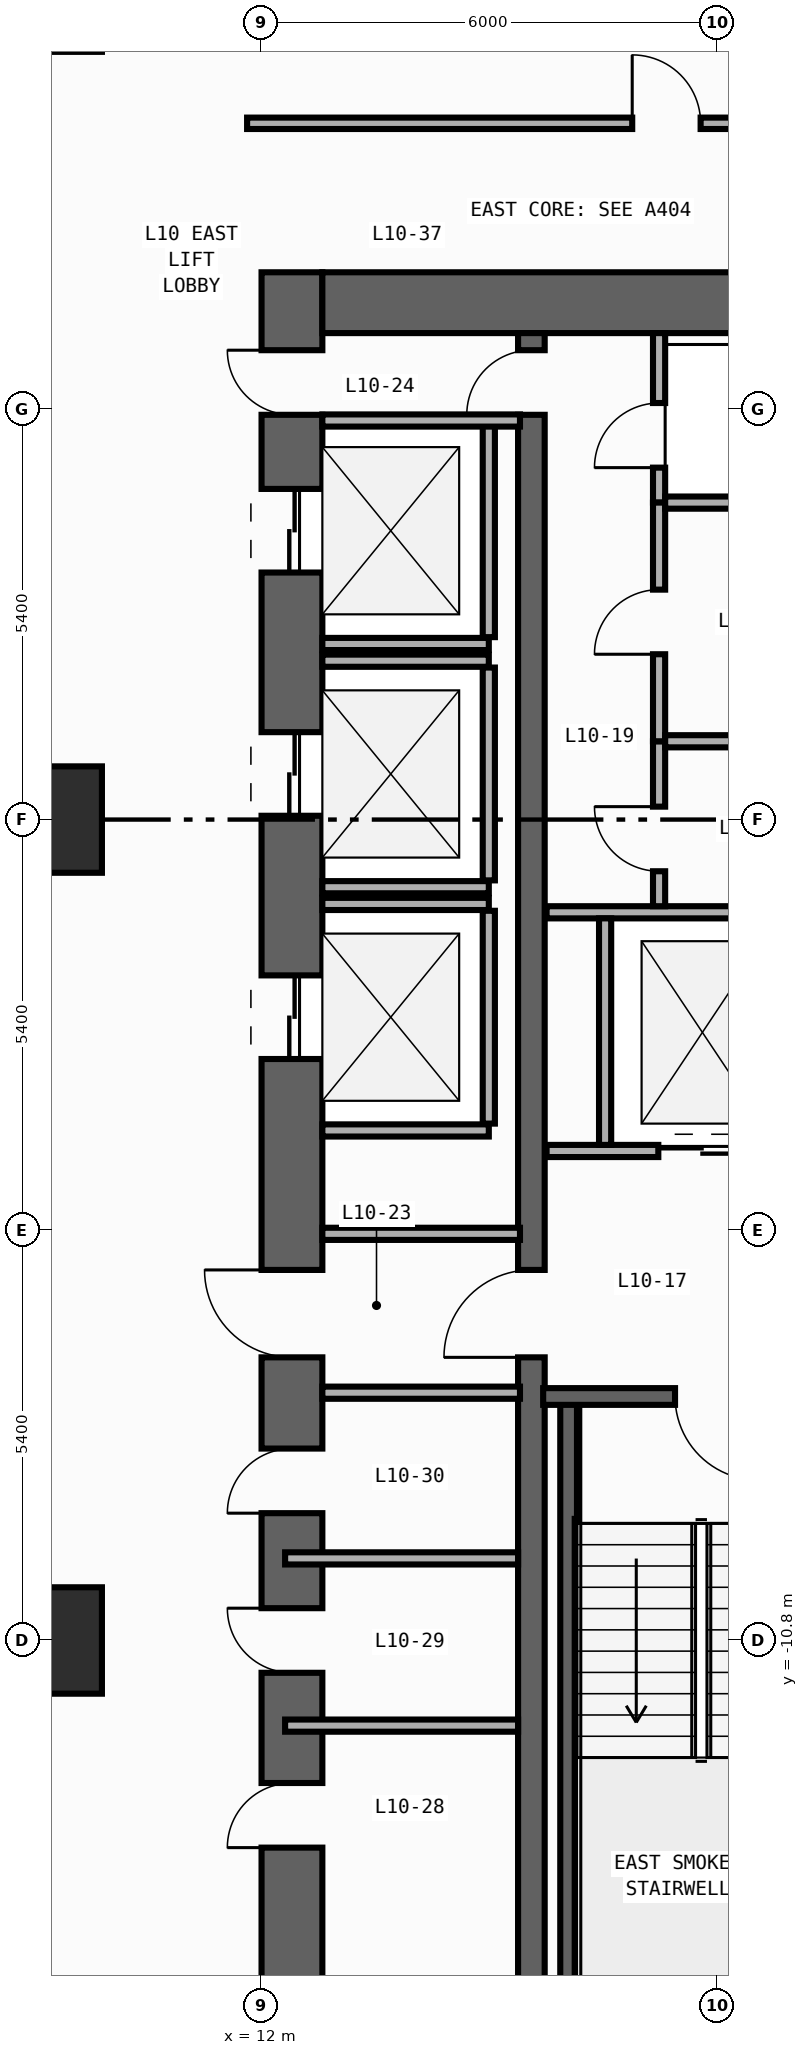
"""IFC4 building model, lengths in metres.
Left out: names, types, materials, properties, quantities, classifications, styles, units other than length and angle.
Written with IfcOpenShell. Run it as: python <this file> out.ifc"""

import sys

from ifc_helpers import new_model, si_unit, direction, frame, frame_2d, origin, origin_2d, place, context, subcontext, project, spatial, rectangle, extrude, element, fill, save


model = new_model("IFC4")
c1 = context("Model", 3, precision=1e-05, world=origin(), true_north=direction((0.0, 1.0)))
c2 = subcontext(c1, "Body", "Model", "MODEL_VIEW")
j1 = project(units=[si_unit("LENGTHUNIT", "METRE"), si_unit("PLANEANGLEUNIT", "RADIAN")], contexts=[c1])
p1 = place(None, origin())
s1 = spatial("IfcSite", under=j1, at=p1, CompositionType="ELEMENT")
p2 = place(p1, origin())
s2 = spatial("IfcBuilding", under=s1, at=p2, CompositionType="ELEMENT")
p3 = place(p2, frame((0.0, 0.0, 42.8)))
s3 = spatial("IfcBuildingStorey", under=s2, at=p3, CompositionType="ELEMENT", Elevation=42.8)
p4 = place(p3, frame((12.4, -19.8, 0.0), z_axis=(0.0, 0.0, 1.0), x_axis=(0.0, 1.0, 0.0)))
e1 = element("IfcWall", 1, at=p4, inside=s3, PredefinedType="SHEAR", context=c2, shape_type="SweptSolid", body=[
    extrude(rectangle(XDim=27.0, YDim=0.8, at=frame_2d((13.5, 0.0))), origin(), (0.0, 0.0, 1.0), 3.94),
])
p5 = place(p4, frame((23.05, 0.0, 0.0)))
e2 = element("IfcOpeningElement", 2, at=p5, cuts=e1, PredefinedType="OPENING", context=c2, shape_type="SweptSolid", body=[
    extrude(rectangle(XDim=1.1, YDim=2.2, at=frame_2d((0.55, 1.1))), frame((0.0, 0.41, 0.0), z_axis=(0.0, -1.0, 0.0), x_axis=(1.0, 0.0, 0.0)), (0.0, 0.0, 1.0), 0.82),
])
p6 = place(p4, frame((19.85, 0.0, 0.0)))
e3 = element("IfcOpeningElement", 3, at=p6, cuts=e1, PredefinedType="OPENING", context=c2, shape_type="SweptSolid", body=[
    extrude(rectangle(XDim=1.1, YDim=2.2, at=frame_2d((0.55, 1.1))), frame((0.0, 0.41, 0.0), z_axis=(0.0, -1.0, 0.0), x_axis=(1.0, 0.0, 0.0)), (0.0, 0.0, 1.0), 0.82),
])
p7 = place(p4, frame((16.65, 0.0, 0.0)))
e4 = element("IfcOpeningElement", 4, at=p7, cuts=e1, PredefinedType="OPENING", context=c2, shape_type="SweptSolid", body=[
    extrude(rectangle(XDim=1.1, YDim=2.2, at=frame_2d((0.55, 1.1))), frame((0.0, 0.41, 0.0), z_axis=(0.0, -1.0, 0.0), x_axis=(1.0, 0.0, 0.0)), (0.0, 0.0, 1.0), 0.82),
])
p8 = place(p4, frame((6.275, 0.0, 0.0)))
e5 = element("IfcOpeningElement", 5, at=p8, cuts=e1, PredefinedType="OPENING", context=c2, shape_type="SweptSolid", body=[
    extrude(rectangle(XDim=0.85, YDim=2.1, at=frame_2d((0.425, 1.05))), frame((0.0, 0.41, 0.0), z_axis=(0.0, -1.0, 0.0), x_axis=(1.0, 0.0, 0.0)), (0.0, 0.0, 1.0), 0.82),
])
p9 = place(p4, frame((8.575, 0.0, 0.0)))
e6 = element("IfcOpeningElement", 6, at=p9, cuts=e1, PredefinedType="OPENING", context=c2, shape_type="SweptSolid", body=[
    extrude(rectangle(XDim=0.85, YDim=2.1, at=frame_2d((0.425, 1.05))), frame((0.0, 0.41, 0.0), z_axis=(0.0, -1.0, 0.0), x_axis=(1.0, 0.0, 0.0)), (0.0, 0.0, 1.0), 0.82),
])
p10 = place(p4, frame((10.675, 0.0, 0.0)))
e7 = element("IfcOpeningElement", 7, at=p10, cuts=e1, PredefinedType="OPENING", context=c2, shape_type="SweptSolid", body=[
    extrude(rectangle(XDim=0.85, YDim=2.1, at=frame_2d((0.425, 1.05))), frame((0.0, 0.41, 0.0), z_axis=(0.0, -1.0, 0.0), x_axis=(1.0, 0.0, 0.0)), (0.0, 0.0, 1.0), 0.82),
])
p11 = place(p4, frame((12.725, 0.0, 0.0)))
e8 = element("IfcOpeningElement", 8, at=p11, cuts=e1, PredefinedType="OPENING", context=c2, shape_type="SweptSolid", body=[
    extrude(rectangle(XDim=1.15, YDim=2.2, at=frame_2d((0.575, 1.1))), frame((0.0, 0.41, 0.0), z_axis=(0.0, -1.0, 0.0), x_axis=(1.0, 0.0, 0.0)), (0.0, 0.0, 1.0), 0.82),
])
p12 = place(p4, frame((25.125, 0.0, 0.0)))
e9 = element("IfcOpeningElement", 9, at=p12, cuts=e1, PredefinedType="OPENING", context=c2, shape_type="SweptSolid", body=[
    extrude(rectangle(XDim=0.85, YDim=2.1, at=frame_2d((0.425, 1.05))), frame((0.0, 0.41, 0.0), z_axis=(0.0, -1.0, 0.0), x_axis=(1.0, 0.0, 0.0)), (0.0, 0.0, 1.0), 0.82),
])
p13 = place(p3, frame((12.8, 6.8, 0.0), z_axis=(0.0, 0.0, 1.0), x_axis=(1.0, 0.0, 0.0)))
e10 = element("IfcWall", 10, at=p13, inside=s3, PredefinedType="SHEAR", context=c2, shape_type="SweptSolid", body=[
    extrude(rectangle(XDim=6.8, YDim=0.8, at=frame_2d((3.4, 0.0))), origin(), (0.0, 0.0, 1.0), 3.94),
])
p14 = place(p3, frame((15.55, -19.0, 0.0), z_axis=(0.0, 0.0, 1.0), x_axis=(0.0, 1.0, 0.0)))
e11 = element("IfcWall", 11, at=p14, inside=s3, PredefinedType="SHEAR", context=c2, shape_type="SweptSolid", body=[
    extrude(rectangle(XDim=25.4, YDim=0.35, at=frame_2d((12.7, 0.0))), origin(), (0.0, 0.0, 1.0), 3.94),
])
p15 = place(p14, frame((11.925, 0.0, 0.0)))
e12 = element("IfcOpeningElement", 12, at=p15, cuts=e11, PredefinedType="OPENING", context=c2, shape_type="SweptSolid", body=[
    extrude(rectangle(XDim=1.15, YDim=2.2, at=frame_2d((0.575, 1.1))), frame((0.0, 0.185, 0.0), z_axis=(0.0, -1.0, 0.0), x_axis=(1.0, 0.0, 0.0)), (0.0, 0.0, 1.0), 0.37),
])
p16 = place(p14, frame((24.325, 0.0, 0.0)))
e13 = element("IfcOpeningElement", 13, at=p16, cuts=e11, PredefinedType="OPENING", context=c2, shape_type="SweptSolid", body=[
    extrude(rectangle(XDim=0.85, YDim=2.1, at=frame_2d((0.425, 1.05))), frame((0.0, 0.185, 0.0), z_axis=(0.0, -1.0, 0.0), x_axis=(1.0, 0.0, 0.0)), (0.0, 0.0, 1.0), 0.37),
])
p17 = place(p3, frame((16.04, -18.89, 0.0), z_axis=(0.0, 0.0, 1.0), x_axis=(0.0, 1.0, 0.0)))
e14 = element("IfcWall", 14, at=p17, inside=s3, PredefinedType="SHEAR", context=c2, shape_type="SweptSolid", body=[
    extrude(rectangle(XDim=11.3, YDim=0.22, at=frame_2d((5.65, 0.0))), origin(), (0.0, 0.0, 1.0), 3.94),
])
p18 = place(p3, frame((19.62, -7.59, 0.0), z_axis=(0.0, 0.0, 1.0), x_axis=(-1.0, 0.0, 0.0)))
e15 = element("IfcWall", 15, at=p18, inside=s3, PredefinedType="SHEAR", context=c2, shape_type="SweptSolid", body=[
    extrude(rectangle(XDim=3.915, YDim=0.22, at=frame_2d((1.958, 0.0))), origin(), (0.0, 0.0, 1.0), 3.94),
])
p19 = place(p18, frame((1.08, 0.0, 0.0)))
e16 = element("IfcOpeningElement", 16, at=p19, cuts=e15, PredefinedType="OPENING", context=c2, shape_type="SweptSolid", body=[
    extrude(rectangle(XDim=1.1, YDim=2.2, at=frame_2d((0.55, 1.1))), frame((0.0, 0.12, 0.0), z_axis=(0.0, -1.0, 0.0), x_axis=(1.0, 0.0, 0.0)), (0.0, 0.0, 1.0), 0.24),
])
for number, where, z_axis, x_axis in (
    (17, (9.2, -10.8, 0.0), (0.0, 0.0, 1.0), (1.0, 0.0, 0.0)),
    (18, (9.2, 0.0, 0.0), (0.0, 0.0, 1.0), (1.0, 0.0, 0.0)),
):
    element("IfcColumn", number, at=place(p3, frame(where, z_axis=z_axis, x_axis=x_axis)), inside=s3, PredefinedType="COLUMN", context=c2, shape_type="SweptSolid", body=[
        extrude(rectangle(XDim=1.4, YDim=1.4, at=origin_2d()), origin(), (0.0, 0.0, 1.0), 4.2),
    ])
p20 = place(p3, frame((12.8, 2.31, 0.0), z_axis=(0.0, 0.0, 1.0), x_axis=(1.0, 0.0, 0.0)))
e19 = element("IfcWall", 19, at=p20, inside=s3, PredefinedType="STANDARD", context=c2, shape_type="SweptSolid", body=[
    extrude(rectangle(XDim=2.19, YDim=0.16, at=frame_2d((1.095, 0.0))), origin(), (0.0, 0.0, 1.0), 3.94),
])
p21 = place(p3, frame((14.99, 2.4, 0.0), z_axis=(0.0, 0.0, 1.0), x_axis=(0.0, 1.0, 0.0)))
e20 = element("IfcWall", 20, at=p21, inside=s3, PredefinedType="STANDARD", context=c2, shape_type="SweptSolid", body=[
    extrude(rectangle(XDim=2.8, YDim=0.16, at=frame_2d((1.4, 0.0))), origin(), (0.0, 0.0, 1.0), 3.94),
])
for number, where, z_axis, x_axis in (
    (21, (12.8, -0.89, 0.0), (0.0, 0.0, 1.0), (1.0, 0.0, 0.0)),
    (22, (12.8, 2.09, 0.0), (0.0, 0.0, 1.0), (1.0, 0.0, 0.0)),
):
    element("IfcWall", number, at=place(p3, frame(where, z_axis=z_axis, x_axis=x_axis)), inside=s3, PredefinedType="STANDARD", context=c2, shape_type="SweptSolid", body=[
        extrude(rectangle(XDim=2.19, YDim=0.16, at=frame_2d((1.095, 0.0))), origin(), (0.0, 0.0, 1.0), 3.94),
    ])
p22 = place(p3, frame((14.99, -0.8, 0.0), z_axis=(0.0, 0.0, 1.0), x_axis=(0.0, 1.0, 0.0)))
e23 = element("IfcWall", 23, at=p22, inside=s3, PredefinedType="STANDARD", context=c2, shape_type="SweptSolid", body=[
    extrude(rectangle(XDim=2.8, YDim=0.16, at=frame_2d((1.4, 0.0))), origin(), (0.0, 0.0, 1.0), 3.94),
])
for number, where, z_axis, x_axis in (
    (24, (12.8, -4.09, 0.0), (0.0, 0.0, 1.0), (1.0, 0.0, 0.0)),
    (25, (12.8, -1.11, 0.0), (0.0, 0.0, 1.0), (1.0, 0.0, 0.0)),
):
    element("IfcWall", number, at=place(p3, frame(where, z_axis=z_axis, x_axis=x_axis)), inside=s3, PredefinedType="STANDARD", context=c2, shape_type="SweptSolid", body=[
        extrude(rectangle(XDim=2.19, YDim=0.16, at=frame_2d((1.095, 0.0))), origin(), (0.0, 0.0, 1.0), 3.94),
    ])
p23 = place(p3, frame((14.99, -4.0, 0.0), z_axis=(0.0, 0.0, 1.0), x_axis=(0.0, 1.0, 0.0)))
e26 = element("IfcWall", 26, at=p23, inside=s3, PredefinedType="STANDARD", context=c2, shape_type="SweptSolid", body=[
    extrude(rectangle(XDim=2.8, YDim=0.16, at=frame_2d((1.4, 0.0))), origin(), (0.0, 0.0, 1.0), 3.94),
])
p24 = place(p3, frame((15.75, -4.36, 0.0), z_axis=(0.0, 0.0, 1.0), x_axis=(1.0, 0.0, 0.0)))
e27 = element("IfcWall", 27, at=p24, inside=s3, PredefinedType="STANDARD", context=c2, shape_type="SweptSolid", body=[
    extrude(rectangle(XDim=3.8, YDim=0.16, at=frame_2d((1.9, 0.0))), origin(), (0.0, 0.0, 1.0), 3.94),
])
p25 = place(p24, frame((1.47, 0.0, 0.0)))
e28 = element("IfcOpeningElement", 28, at=p25, cuts=e27, PredefinedType="OPENING", context=c2, shape_type="SweptSolid", body=[
    extrude(rectangle(XDim=1.15, YDim=2.2, at=frame_2d((0.575, 1.1))), frame((0.0, 0.09, 0.0), z_axis=(0.0, -1.0, 0.0), x_axis=(1.0, 0.0, 0.0)), (0.0, 0.0, 1.0), 0.18),
])
p26 = place(p3, frame((15.75, -1.22, 0.0), z_axis=(0.0, 0.0, 1.0), x_axis=(1.0, 0.0, 0.0)))
e29 = element("IfcWall", 29, at=p26, inside=s3, PredefinedType="STANDARD", context=c2, shape_type="SweptSolid", body=[
    extrude(rectangle(XDim=3.8, YDim=0.16, at=frame_2d((1.9, 0.0))), origin(), (0.0, 0.0, 1.0), 3.94),
])
p27 = place(p3, frame((16.52, -4.28, 0.0), z_axis=(0.0, 0.0, 1.0), x_axis=(0.0, 1.0, 0.0)))
e30 = element("IfcWall", 30, at=p27, inside=s3, PredefinedType="STANDARD", context=c2, shape_type="SweptSolid", body=[
    extrude(rectangle(XDim=2.98, YDim=0.16, at=frame_2d((1.49, 0.0))), origin(), (0.0, 0.0, 1.0), 3.94),
])
for number, where, z_axis, x_axis in (
    (31, (12.8, -5.45, 0.0), (0.0, 0.0, 1.0), (1.0, 0.0, 0.0)),
    (32, (12.8, -7.54, 0.0), (0.0, 0.0, 1.0), (1.0, 0.0, 0.0)),
    (33, (12.8, 5.25, 0.0), (0.0, 0.0, 1.0), (1.0, 0.0, 0.0)),
):
    element("IfcWall", number, at=place(p3, frame(where, z_axis=z_axis, x_axis=x_axis)), inside=s3, PredefinedType="STANDARD", context=c2, shape_type="SweptSolid", body=[
        extrude(rectangle(XDim=2.6, YDim=0.16, at=frame_2d((1.3, 0.0))), origin(), (0.0, 0.0, 1.0), 3.94),
    ])
p28 = place(p3, frame((17.23, 4.17, 0.0), z_axis=(0.0, 0.0, 1.0), x_axis=(0.0, 1.0, 0.0)))
e34 = element("IfcWall", 34, at=p28, inside=s3, PredefinedType="PARTITIONING", context=c2, shape_type="SweptSolid", body=[
    extrude(rectangle(XDim=2.23, YDim=0.16, at=frame_2d((1.115, 0.0))), origin(), (0.0, 0.0, 1.0), 3.94),
])
p29 = place(p28, frame((0.46, 0.0, 0.0)))
e35 = element("IfcOpeningElement", 35, at=p29, cuts=e34, PredefinedType="OPENING", context=c2, shape_type="SweptSolid", body=[
    extrude(rectangle(XDim=0.85, YDim=2.1, at=frame_2d((0.425, 1.05))), frame((0.0, 0.09, 0.0), z_axis=(0.0, -1.0, 0.0), x_axis=(1.0, 0.0, 0.0)), (0.0, 0.0, 1.0), 0.18),
])
p30 = place(p3, frame((17.23, -1.14, 0.0), z_axis=(0.0, 0.0, 1.0), x_axis=(0.0, 1.0, 0.0)))
e36 = element("IfcWall", 36, at=p30, inside=s3, PredefinedType="PARTITIONING", context=c2, shape_type="SweptSolid", body=[
    extrude(rectangle(XDim=2.17, YDim=0.16, at=frame_2d((1.085, 0.0))), origin(), (0.0, 0.0, 1.0), 3.94),
])
p31 = place(p30, frame((0.46, 0.0, 0.0)))
e37 = element("IfcOpeningElement", 37, at=p31, cuts=e36, PredefinedType="OPENING", context=c2, shape_type="SweptSolid", body=[
    extrude(rectangle(XDim=0.85, YDim=2.1, at=frame_2d((0.425, 1.05))), frame((0.0, 0.09, 0.0), z_axis=(0.0, -1.0, 0.0), x_axis=(1.0, 0.0, 0.0)), (0.0, 0.0, 1.0), 0.18),
])
p32 = place(p3, frame((17.23, 1.03, 0.0), z_axis=(0.0, 0.0, 1.0), x_axis=(0.0, 1.0, 0.0)))
e38 = element("IfcWall", 38, at=p32, inside=s3, PredefinedType="PARTITIONING", context=c2, shape_type="SweptSolid", body=[
    extrude(rectangle(XDim=3.14, YDim=0.16, at=frame_2d((1.57, 0.0))), origin(), (0.0, 0.0, 1.0), 3.94),
])
p33 = place(p32, frame((1.145, 0.0, 0.0)))
e39 = element("IfcOpeningElement", 39, at=p33, cuts=e38, PredefinedType="OPENING", context=c2, shape_type="SweptSolid", body=[
    extrude(rectangle(XDim=0.85, YDim=2.1, at=frame_2d((0.425, 1.05))), frame((0.0, 0.09, 0.0), z_axis=(0.0, -1.0, 0.0), x_axis=(1.0, 0.0, 0.0)), (0.0, 0.0, 1.0), 0.18),
])
for number, where, z_axis, x_axis in (
    (40, (17.31, 4.17, 0.0), (0.0, 0.0, 1.0), (1.0, 0.0, 0.0)),
    (41, (17.31, 1.03, 0.0), (0.0, 0.0, 1.0), (1.0, 0.0, 0.0)),
):
    element("IfcWall", number, at=place(p3, frame(where, z_axis=z_axis, x_axis=x_axis)), inside=s3, PredefinedType="PARTITIONING", context=c2, shape_type="SweptSolid", body=[
        extrude(rectangle(XDim=2.29, YDim=0.16, at=frame_2d((1.145, 0.0))), origin(), (0.0, 0.0, 1.0), 3.94),
    ])
for number, where, z_axis, x_axis in (
    (42, (12.31, -11.92, 0.0), (0.0, 0.0, 1.0), (1.0, 0.0, 0.0)),
    (43, (12.31, -9.72, 0.0), (0.0, 0.0, 1.0), (1.0, 0.0, 0.0)),
):
    element("IfcWall", number, at=place(p3, frame(where, z_axis=z_axis, x_axis=x_axis)), inside=s3, PredefinedType="PARTITIONING", context=c2, shape_type="SweptSolid", body=[
        extrude(rectangle(XDim=3.065, YDim=0.16, at=frame_2d((1.532, 0.0))), origin(), (0.0, 0.0, 1.0), 3.94),
    ])
p34 = place(p3, frame((11.81, 9.16, 0.0), z_axis=(0.0, 0.0, 1.0), x_axis=(1.0, 0.0, 0.0)))
e44 = element("IfcWall", 44, at=p34, inside=s3, PredefinedType="PARTITIONING", context=c2, shape_type="SweptSolid", body=[
    extrude(rectangle(XDim=8.83, YDim=0.15, at=frame_2d((4.415, 0.0))), origin(), (0.0, 0.0, 1.0), 3.94),
])
p35 = place(p34, frame((5.067, 0.0, 0.0)))
e45 = element("IfcOpeningElement", 45, at=p35, cuts=e44, PredefinedType="OPENING", context=c2, shape_type="SweptSolid", body=[
    extrude(rectangle(XDim=0.9, YDim=2.15, at=frame_2d((0.45, 1.075))), frame((0.0, 0.085, 0.0), z_axis=(0.0, -1.0, 0.0), x_axis=(1.0, 0.0, 0.0)), (0.0, 0.0, 1.0), 0.17),
])
p36 = place(p19, origin())
e46 = element("IfcDoor", 46, at=p36, inside=s3, OperationType="SINGLE_SWING_LEFT", PredefinedType="DOOR", context=c2, shape_type="SweptSolid", body=[
    extrude(rectangle(XDim=1.1, YDim=2.2, at=frame_2d((0.55, 1.1))), frame((0.0, 0.025, 0.0), z_axis=(0.0, -1.0, 0.0), x_axis=(1.0, 0.0, 0.0)), (0.0, 0.0, 1.0), 0.05),
])
fill(e16, e46)
p37 = place(p5, origin())
e47 = element("IfcDoor", 47, at=p37, inside=s3, OperationType="DOUBLE_DOOR_SLIDING", PredefinedType="DOOR", context=c2, shape_type="SweptSolid", body=[
    extrude(rectangle(XDim=1.1, YDim=2.2, at=frame_2d((0.55, 1.1))), frame((0.0, 0.025, 0.0), z_axis=(0.0, -1.0, 0.0), x_axis=(1.0, 0.0, 0.0)), (0.0, 0.0, 1.0), 0.05),
])
fill(e2, e47)
p38 = place(p6, origin())
e48 = element("IfcDoor", 48, at=p38, inside=s3, OperationType="DOUBLE_DOOR_SLIDING", PredefinedType="DOOR", context=c2, shape_type="SweptSolid", body=[
    extrude(rectangle(XDim=1.1, YDim=2.2, at=frame_2d((0.55, 1.1))), frame((0.0, 0.025, 0.0), z_axis=(0.0, -1.0, 0.0), x_axis=(1.0, 0.0, 0.0)), (0.0, 0.0, 1.0), 0.05),
])
fill(e3, e48)
p39 = place(p7, origin())
e49 = element("IfcDoor", 49, at=p39, inside=s3, OperationType="DOUBLE_DOOR_SLIDING", PredefinedType="DOOR", context=c2, shape_type="SweptSolid", body=[
    extrude(rectangle(XDim=1.1, YDim=2.2, at=frame_2d((0.55, 1.1))), frame((0.0, 0.025, 0.0), z_axis=(0.0, -1.0, 0.0), x_axis=(1.0, 0.0, 0.0)), (0.0, 0.0, 1.0), 0.05),
])
fill(e4, e49)
p40 = place(p8, origin())
e50 = element("IfcDoor", 50, at=p40, inside=s3, OperationType="SINGLE_SWING_LEFT", PredefinedType="DOOR", context=c2, shape_type="SweptSolid", body=[
    extrude(rectangle(XDim=0.85, YDim=2.1, at=frame_2d((0.425, 1.05))), frame((0.0, 0.025, 0.0), z_axis=(0.0, -1.0, 0.0), x_axis=(1.0, 0.0, 0.0)), (0.0, 0.0, 1.0), 0.05),
])
fill(e5, e50)
p41 = place(p9, origin())
e51 = element("IfcDoor", 51, at=p41, inside=s3, OperationType="SINGLE_SWING_RIGHT", PredefinedType="DOOR", context=c2, shape_type="SweptSolid", body=[
    extrude(rectangle(XDim=0.85, YDim=2.1, at=frame_2d((0.425, 1.05))), frame((0.0, 0.025, 0.0), z_axis=(0.0, -1.0, 0.0), x_axis=(1.0, 0.0, 0.0)), (0.0, 0.0, 1.0), 0.05),
])
fill(e6, e51)
p42 = place(p10, origin())
e52 = element("IfcDoor", 52, at=p42, inside=s3, OperationType="SINGLE_SWING_LEFT", PredefinedType="DOOR", context=c2, shape_type="SweptSolid", body=[
    extrude(rectangle(XDim=0.85, YDim=2.1, at=frame_2d((0.425, 1.05))), frame((0.0, 0.025, 0.0), z_axis=(0.0, -1.0, 0.0), x_axis=(1.0, 0.0, 0.0)), (0.0, 0.0, 1.0), 0.05),
])
fill(e7, e52)
p43 = place(p11, origin())
e53 = element("IfcDoor", 53, at=p43, inside=s3, OperationType="SINGLE_SWING_RIGHT", PredefinedType="DOOR", context=c2, shape_type="SweptSolid", body=[
    extrude(rectangle(XDim=1.15, YDim=2.2, at=frame_2d((0.575, 1.1))), frame((0.0, 0.025, 0.0), z_axis=(0.0, -1.0, 0.0), x_axis=(1.0, 0.0, 0.0)), (0.0, 0.0, 1.0), 0.05),
])
fill(e8, e53)
p44 = place(p15, origin())
e54 = element("IfcDoor", 54, at=p44, inside=s3, OperationType="SINGLE_SWING_LEFT", PredefinedType="DOOR", context=c2, shape_type="SweptSolid", body=[
    extrude(rectangle(XDim=1.15, YDim=2.2, at=frame_2d((0.575, 1.1))), frame((0.0, 0.025, 0.0), z_axis=(0.0, -1.0, 0.0), x_axis=(1.0, 0.0, 0.0)), (0.0, 0.0, 1.0), 0.05),
])
fill(e12, e54)
p45 = place(p12, origin())
e55 = element("IfcDoor", 55, at=p45, inside=s3, OperationType="SINGLE_SWING_RIGHT", PredefinedType="DOOR", context=c2, shape_type="SweptSolid", body=[
    extrude(rectangle(XDim=0.85, YDim=2.1, at=frame_2d((0.425, 1.05))), frame((0.0, 0.025, 0.0), z_axis=(0.0, -1.0, 0.0), x_axis=(1.0, 0.0, 0.0)), (0.0, 0.0, 1.0), 0.05),
])
fill(e9, e55)
p46 = place(p16, origin())
e56 = element("IfcDoor", 56, at=p46, inside=s3, OperationType="SINGLE_SWING_LEFT", PredefinedType="DOOR", context=c2, shape_type="SweptSolid", body=[
    extrude(rectangle(XDim=0.85, YDim=2.1, at=frame_2d((0.425, 1.05))), frame((0.0, 0.025, 0.0), z_axis=(0.0, -1.0, 0.0), x_axis=(1.0, 0.0, 0.0)), (0.0, 0.0, 1.0), 0.05),
])
fill(e13, e56)
p47 = place(p25, origin())
e57 = element("IfcDoor", 57, at=p47, inside=s3, OperationType="DOUBLE_DOOR_SLIDING", PredefinedType="DOOR", context=c2, shape_type="SweptSolid", body=[
    extrude(rectangle(XDim=1.15, YDim=2.2, at=frame_2d((0.575, 1.1))), frame((0.0, 0.025, 0.0), z_axis=(0.0, -1.0, 0.0), x_axis=(1.0, 0.0, 0.0)), (0.0, 0.0, 1.0), 0.05),
])
fill(e28, e57)
p48 = place(p29, origin())
e58 = element("IfcDoor", 58, at=p48, inside=s3, OperationType="SINGLE_SWING_LEFT", PredefinedType="DOOR", context=c2, shape_type="SweptSolid", body=[
    extrude(rectangle(XDim=0.85, YDim=2.1, at=frame_2d((0.425, 1.05))), frame((0.0, 0.025, 0.0), z_axis=(0.0, -1.0, 0.0), x_axis=(1.0, 0.0, 0.0)), (0.0, 0.0, 1.0), 0.05),
])
fill(e35, e58)
p49 = place(p31, origin())
e59 = element("IfcDoor", 59, at=p49, inside=s3, OperationType="SINGLE_SWING_RIGHT", PredefinedType="DOOR", context=c2, shape_type="SweptSolid", body=[
    extrude(rectangle(XDim=0.85, YDim=2.1, at=frame_2d((0.425, 1.05))), frame((0.0, 0.025, 0.0), z_axis=(0.0, -1.0, 0.0), x_axis=(1.0, 0.0, 0.0)), (0.0, 0.0, 1.0), 0.05),
])
fill(e37, e59)
p50 = place(p33, origin())
e60 = element("IfcDoor", 60, at=p50, inside=s3, OperationType="SINGLE_SWING_LEFT", PredefinedType="DOOR", context=c2, shape_type="SweptSolid", body=[
    extrude(rectangle(XDim=0.85, YDim=2.1, at=frame_2d((0.425, 1.05))), frame((0.0, 0.025, 0.0), z_axis=(0.0, -1.0, 0.0), x_axis=(1.0, 0.0, 0.0)), (0.0, 0.0, 1.0), 0.05),
])
fill(e39, e60)
p51 = place(p35, origin())
e61 = element("IfcDoor", 61, at=p51, inside=s3, OperationType="SINGLE_SWING_LEFT", PredefinedType="DOOR", context=c2, shape_type="SweptSolid", body=[
    extrude(rectangle(XDim=0.9, YDim=2.15, at=frame_2d((0.45, 1.075))), frame((0.0, 0.025, 0.0), z_axis=(0.0, -1.0, 0.0), x_axis=(1.0, 0.0, 0.0)), (0.0, 0.0, 1.0), 0.05),
])
fill(e45, e61)
save(model, sys.argv[1])
